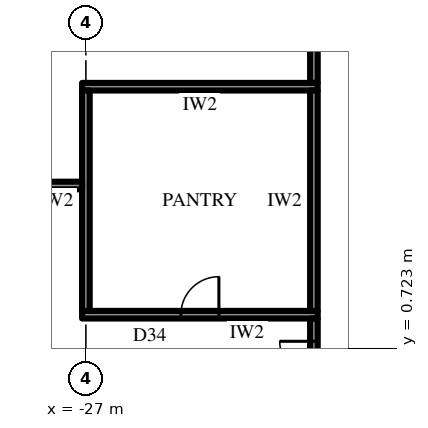
"""IFC4 building model, lengths in metres.
Left out: names, types, materials, properties, quantities, classifications, styles, units other than length and angle.
Written with IfcOpenShell. Run it as: python <this file> out.ifc"""

import sys

from ifc_helpers import new_model, si_unit, direction, frame, frame_2d, origin, place, context, subcontext, project, spatial, rectangle, extrude, element, fill, save


model = new_model("IFC4")
c1 = context("Model", 3, precision=1e-05, world=origin(), true_north=direction((0.0, 1.0)))
c2 = subcontext(c1, "Body", "Model", "MODEL_VIEW")
j1 = project(units=[si_unit("LENGTHUNIT", "METRE"), si_unit("PLANEANGLEUNIT", "RADIAN")], contexts=[c1])
p1 = place(None, origin())
s1 = spatial("IfcSite", under=j1, at=p1, CompositionType="ELEMENT")
p2 = place(p1, origin())
s2 = spatial("IfcBuilding", under=s1, at=p2, CompositionType="ELEMENT")
p3 = place(p2, frame((0.0, 0.0, 23.5)))
s3 = spatial("IfcBuildingStorey", under=s2, at=p3, CompositionType="ELEMENT", Elevation=23.5)
p4 = place(p3, frame((-20.9, 1.6, 0.0), z_axis=(0.0, 0.0, 1.0), x_axis=(-1.0, 0.0, 0.0)))
e1 = element("IfcWall", 1, at=p4, inside=s3, PredefinedType="PARTITIONING", context=c2, shape_type="SweptSolid", body=[
    extrude(rectangle(XDim=6.2, YDim=0.2, at=frame_2d((3.1, 0.0))), origin(), (0.0, 0.0, 1.0), 4.0),
])
p5 = place(p4, frame((2.6, 0.0, 0.0)))
e2 = element("IfcOpeningElement", 2, at=p5, cuts=e1, PredefinedType="OPENING", context=c2, shape_type="SweptSolid", body=[
    extrude(rectangle(XDim=1.0, YDim=2.2, at=frame_2d((0.5, 1.1))), frame((0.0, 0.11, 0.0), z_axis=(0.0, -1.0, 0.0), x_axis=(1.0, 0.0, 0.0)), (0.0, 0.0, 1.0), 0.22),
])
p6 = place(p3, frame((-20.9, 7.6, 0.0), z_axis=(0.0, 0.0, 1.0), x_axis=(-1.0, 0.0, 0.0)))
e3 = element("IfcWall", 3, at=p6, inside=s3, PredefinedType="PARTITIONING", context=c2, shape_type="SweptSolid", body=[
    extrude(rectangle(XDim=6.2, YDim=0.2, at=frame_2d((3.1, 0.0))), origin(), (0.0, 0.0, 1.0), 4.0),
])
for number, where, z_axis, x_axis in (
    (4, (-21.0, 1.7, 0.0), (0.0, 0.0, 1.0), (0.0, 1.0, 0.0)),
    (5, (-27.0, 1.7, 0.0), (0.0, 0.0, 1.0), (0.0, 1.0, 0.0)),
):
    element("IfcWall", number, at=place(p3, frame(where, z_axis=z_axis, x_axis=x_axis)), inside=s3, PredefinedType="PARTITIONING", context=c2, shape_type="SweptSolid", body=[
        extrude(rectangle(XDim=5.8, YDim=0.2, at=frame_2d((2.9, 0.0))), origin(), (0.0, 0.0, 1.0), 4.0),
    ])
p7 = place(p3, frame((-21.0, -13.1, 0.0), z_axis=(0.0, 0.0, 1.0), x_axis=(0.0, 1.0, 0.0)))
e6 = element("IfcWall", 6, at=p7, inside=s3, PredefinedType="PARTITIONING", context=c2, shape_type="SweptSolid", body=[
    extrude(rectangle(XDim=14.599, YDim=0.2, at=frame_2d((7.3, 0.0))), origin(), (0.0, 0.0, 1.0), 4.0),
])
p8 = place(p7, frame((12.2, 0.0, 0.0)))
e7 = element("IfcOpeningElement", 7, at=p8, cuts=e6, PredefinedType="OPENING", context=c2, shape_type="SweptSolid", body=[
    extrude(rectangle(XDim=1.8, YDim=2.4, at=frame_2d((0.9, 1.2))), frame((0.0, 0.11, 0.0), z_axis=(0.0, -1.0, 0.0), x_axis=(1.0, 0.0, 0.0)), (0.0, 0.0, 1.0), 0.22),
])
p9 = place(p3, frame((-21.0, 7.701, 0.0), z_axis=(0.0, 0.0, 1.0), x_axis=(0.0, 1.0, 0.0)))
e8 = element("IfcWall", 8, at=p9, inside=s3, PredefinedType="PARTITIONING", context=c2, shape_type="SweptSolid", body=[
    extrude(rectangle(XDim=5.399, YDim=0.2, at=frame_2d((2.7, 0.0))), origin(), (0.0, 0.0, 1.0), 4.0),
])
p10 = place(p3, frame((-27.1, 5.0, 0.0), z_axis=(0.0, 0.0, 1.0), x_axis=(-1.0, 0.0, 0.0)))
e9 = element("IfcWall", 9, at=p10, inside=s3, PredefinedType="PARTITIONING", context=c2, shape_type="SweptSolid", body=[
    extrude(rectangle(XDim=9.019, YDim=0.2, at=frame_2d((4.509, 0.0))), origin(), (0.0, 0.0, 1.0), 4.0),
])
p11 = place(p5, frame((1.0, 0.0, 0.0), z_axis=(0.0, 0.0, 1.0), x_axis=(-1.0, 0.0, 0.0)))
e10 = element("IfcDoor", 10, at=p11, inside=s3, OperationType="SINGLE_SWING_LEFT", PredefinedType="DOOR", context=c2, shape_type="SweptSolid", body=[
    extrude(rectangle(XDim=1.0, YDim=2.2, at=frame_2d((0.5, 1.1))), frame((0.0, 0.025, 0.0), z_axis=(0.0, -1.0, 0.0), x_axis=(1.0, 0.0, 0.0)), (0.0, 0.0, 1.0), 0.05),
])
fill(e2, e10)
p12 = place(p8, origin())
e11 = element("IfcDoor", 11, at=p12, inside=s3, OperationType="DOUBLE_DOOR_SINGLE_SWING", PredefinedType="DOOR", context=c2, shape_type="SweptSolid", body=[
    extrude(rectangle(XDim=1.8, YDim=2.4, at=frame_2d((0.9, 1.2))), frame((0.0, 0.025, 0.0), z_axis=(0.0, -1.0, 0.0), x_axis=(1.0, 0.0, 0.0)), (0.0, 0.0, 1.0), 0.05),
])
fill(e7, e11)
save(model, sys.argv[1])
